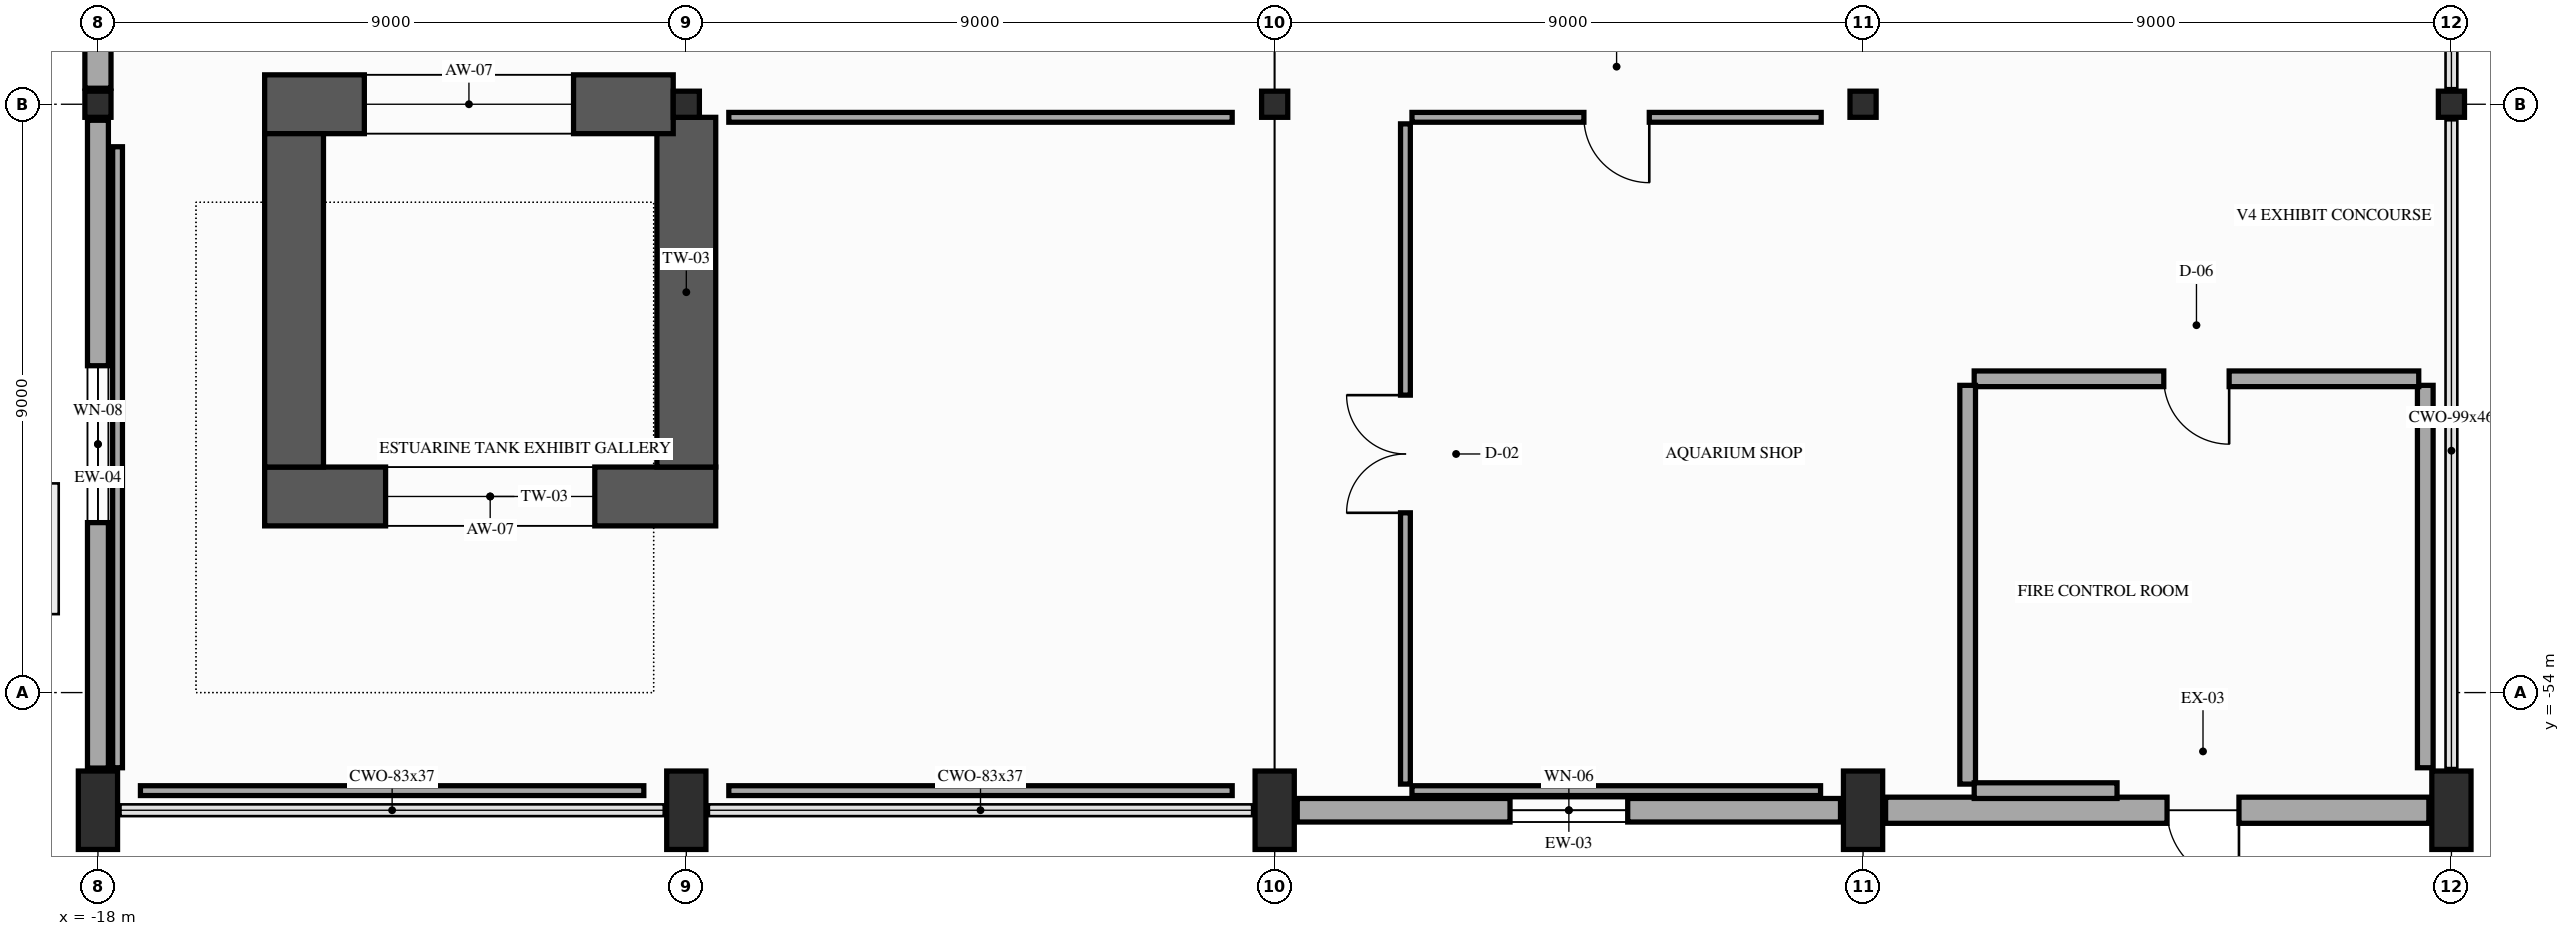
"""IFC4 building model, lengths in metres.
Left out: names, types, materials, properties, quantities, classifications, styles, units other than length and angle.
Written with IfcOpenShell. Run it as: python <this file> out.ifc"""

import sys

from ifc_helpers import new_model, si_unit, direction, frame, frame_2d, origin, origin_2d, place, context, subcontext, project, spatial, rectangle, i_section, extrude, element, fill, save


model = new_model("IFC4")
c1 = context("Model", 3, precision=1e-05, world=origin(), true_north=direction((0.0, 1.0)))
c2 = subcontext(c1, "Body", "Model", "MODEL_VIEW")
j1 = project(units=[si_unit("LENGTHUNIT", "METRE"), si_unit("PLANEANGLEUNIT", "RADIAN")], contexts=[c1])
p1 = place(None, origin())
s1 = spatial("IfcSite", under=j1, at=p1, CompositionType="ELEMENT")
p2 = place(p1, origin())
s2 = spatial("IfcBuilding", under=s1, at=p2, CompositionType="ELEMENT")
p3 = place(p2, origin())
s3 = spatial("IfcBuildingStorey", under=s2, at=p3, CompositionType="ELEMENT", Elevation=0.0)
p4 = place(p3, frame((-18.0, -55.8, 0.0), z_axis=(0.0, 0.0, 1.0), x_axis=(1.0, 0.0, 0.0)))
e1 = element("IfcColumn", 1, at=p4, inside=s3, PredefinedType="PILASTER", context=c2, shape_type="SweptSolid", body=[
    extrude(rectangle(XDim=0.6, YDim=1.2, at=origin_2d()), origin(), (0.0, 0.0, 1.0), 5.4),
])
p5 = place(p3, frame((-18.0, -45.0, 0.0), z_axis=(0.0, 0.0, 1.0), x_axis=(1.0, 0.0, 0.0)))
e2 = element("IfcColumn", 2, at=p5, inside=s3, PredefinedType="COLUMN", context=c2, shape_type="SweptSolid", body=[
    extrude(i_section(OverallWidth=0.4, OverallDepth=0.4, WebThickness=0.013, FlangeThickness=0.021, FilletRadius=0.022, at=origin_2d()), origin(), (0.0, 0.0, 1.0), 5.4),
])
p6 = place(p3, frame((-9.0, -55.8, 0.0), z_axis=(0.0, 0.0, 1.0), x_axis=(1.0, 0.0, 0.0)))
e3 = element("IfcColumn", 3, at=p6, inside=s3, PredefinedType="PILASTER", context=c2, shape_type="SweptSolid", body=[
    extrude(rectangle(XDim=0.6, YDim=1.2, at=origin_2d()), origin(), (0.0, 0.0, 1.0), 5.4),
])
p7 = place(p3, frame((-9.0, -45.0, 0.0), z_axis=(0.0, 0.0, 1.0), x_axis=(1.0, 0.0, 0.0)))
e4 = element("IfcColumn", 4, at=p7, inside=s3, PredefinedType="COLUMN", context=c2, shape_type="SweptSolid", body=[
    extrude(i_section(OverallWidth=0.4, OverallDepth=0.4, WebThickness=0.013, FlangeThickness=0.021, FilletRadius=0.022, at=origin_2d()), origin(), (0.0, 0.0, 1.0), 5.4),
])
p8 = place(p3, frame((0.0, -55.8, 0.0), z_axis=(0.0, 0.0, 1.0), x_axis=(1.0, 0.0, 0.0)))
e5 = element("IfcColumn", 5, at=p8, inside=s3, PredefinedType="PILASTER", context=c2, shape_type="SweptSolid", body=[
    extrude(rectangle(XDim=0.6, YDim=1.2, at=origin_2d()), origin(), (0.0, 0.0, 1.0), 5.4),
])
p9 = place(p3, frame((0.0, -45.0, 0.0), z_axis=(0.0, 0.0, 1.0), x_axis=(1.0, 0.0, 0.0)))
e6 = element("IfcColumn", 6, at=p9, inside=s3, PredefinedType="COLUMN", context=c2, shape_type="SweptSolid", body=[
    extrude(i_section(OverallWidth=0.4, OverallDepth=0.4, WebThickness=0.013, FlangeThickness=0.021, FilletRadius=0.022, at=origin_2d()), origin(), (0.0, 0.0, 1.0), 5.4),
])
p10 = place(p3, frame((9.0, -55.8, 0.0), z_axis=(0.0, 0.0, 1.0), x_axis=(1.0, 0.0, 0.0)))
e7 = element("IfcColumn", 7, at=p10, inside=s3, PredefinedType="PILASTER", context=c2, shape_type="SweptSolid", body=[
    extrude(rectangle(XDim=0.6, YDim=1.2, at=origin_2d()), origin(), (0.0, 0.0, 1.0), 5.4),
])
p11 = place(p3, frame((9.0, -45.0, 0.0), z_axis=(0.0, 0.0, 1.0), x_axis=(1.0, 0.0, 0.0)))
e8 = element("IfcColumn", 8, at=p11, inside=s3, PredefinedType="COLUMN", context=c2, shape_type="SweptSolid", body=[
    extrude(i_section(OverallWidth=0.4, OverallDepth=0.4, WebThickness=0.013, FlangeThickness=0.021, FilletRadius=0.022, at=origin_2d()), origin(), (0.0, 0.0, 1.0), 5.4),
])
p12 = place(p3, frame((18.0, -55.8, 0.0), z_axis=(0.0, 0.0, 1.0), x_axis=(1.0, 0.0, 0.0)))
e9 = element("IfcColumn", 9, at=p12, inside=s3, PredefinedType="PILASTER", context=c2, shape_type="SweptSolid", body=[
    extrude(rectangle(XDim=0.6, YDim=1.2, at=origin_2d()), origin(), (0.0, 0.0, 1.0), 5.4),
])
p13 = place(p3, frame((18.0, -45.0, 0.0), z_axis=(0.0, 0.0, 1.0), x_axis=(1.0, 0.0, 0.0)))
e10 = element("IfcColumn", 10, at=p13, inside=s3, PredefinedType="COLUMN", context=c2, shape_type="SweptSolid", body=[
    extrude(i_section(OverallWidth=0.4, OverallDepth=0.4, WebThickness=0.013, FlangeThickness=0.021, FilletRadius=0.022, at=origin_2d()), origin(), (0.0, 0.0, 1.0), 5.4),
])
p14 = place(p3, frame((-15.45, -51.0, 0.0), z_axis=(0.0, 0.0, 1.0), x_axis=(1.0, 0.0, 0.0)))
e11 = element("IfcWall", 11, at=p14, inside=s3, PredefinedType="SHEAR", context=c2, shape_type="SweptSolid", body=[
    extrude(rectangle(XDim=6.9, YDim=0.9, at=frame_2d((3.45, 0.0))), origin(), (0.0, 0.0, 1.0), 4.5),
])
p15 = place(p14, frame((1.85, 0.0, 0.8)))
e12 = element("IfcOpeningElement", 12, at=p15, cuts=e11, PredefinedType="OPENING", context=c2, shape_type="SweptSolid", body=[
    extrude(rectangle(XDim=3.2, YDim=2.2, at=frame_2d((1.6, 1.1))), frame((0.0, 0.46, 0.0), z_axis=(0.0, -1.0, 0.0), x_axis=(1.0, 0.0, 0.0)), (0.0, 0.0, 1.0), 0.92),
])
p16 = place(p3, frame((-9.0, -50.55, 0.0), z_axis=(0.0, 0.0, 1.0), x_axis=(0.0, 1.0, 0.0)))
e13 = element("IfcWall", 13, at=p16, inside=s3, PredefinedType="SHEAR", context=c2, shape_type="SweptSolid", body=[
    extrude(rectangle(XDim=5.35, YDim=0.9, at=frame_2d((2.675, 0.0))), origin(), (0.0, 0.0, 1.0), 4.5),
])
p17 = place(p3, frame((-9.2, -45.0, 0.0), z_axis=(0.0, 0.0, 1.0), x_axis=(-1.0, 0.0, 0.0)))
e14 = element("IfcWall", 14, at=p17, inside=s3, PredefinedType="SHEAR", context=c2, shape_type="SweptSolid", body=[
    extrude(rectangle(XDim=6.25, YDim=0.9, at=frame_2d((3.125, 0.0))), origin(), (0.0, 0.0, 1.0), 4.5),
])
p18 = place(p17, frame((1.525, 0.0, 0.8)))
e15 = element("IfcOpeningElement", 15, at=p18, cuts=e14, PredefinedType="OPENING", context=c2, shape_type="SweptSolid", body=[
    extrude(rectangle(XDim=3.2, YDim=2.2, at=frame_2d((1.6, 1.1))), frame((0.0, 0.46, 0.0), z_axis=(0.0, -1.0, 0.0), x_axis=(1.0, 0.0, 0.0)), (0.0, 0.0, 1.0), 0.92),
])
p19 = place(p3, frame((-15.0, -45.45, 0.0), z_axis=(0.0, 0.0, 1.0), x_axis=(0.0, -1.0, 0.0)))
e16 = element("IfcWall", 16, at=p19, inside=s3, PredefinedType="SHEAR", context=c2, shape_type="SweptSolid", body=[
    extrude(rectangle(XDim=5.1, YDim=0.9, at=frame_2d((2.55, 0.0))), origin(), (0.0, 0.0, 1.0), 4.5),
])
p20 = place(p3, frame((17.655, -55.8, 0.0), z_axis=(0.0, 0.0, 1.0), x_axis=(-1.0, 0.0, 0.0)))
e17 = element("IfcWall", 17, at=p20, inside=s3, PredefinedType="SOLIDWALL", context=c2, shape_type="SweptSolid", body=[
    extrude(rectangle(XDim=8.31, YDim=0.4, at=frame_2d((4.155, 0.0))), origin(), (0.0, 0.0, 1.0), 3.755),
])
p21 = place(p20, frame((2.905, 0.0, 0.0)))
e18 = element("IfcOpeningElement", 18, at=p21, cuts=e17, PredefinedType="OPENING", context=c2, shape_type="SweptSolid", body=[
    extrude(rectangle(XDim=1.1, YDim=2.2, at=frame_2d((0.55, 1.1))), frame((0.0, 0.21, 0.0), z_axis=(0.0, -1.0, 0.0), x_axis=(1.0, 0.0, 0.0)), (0.0, 0.0, 1.0), 0.42),
])
p22 = place(p3, frame((8.655, -55.8, 0.0), z_axis=(0.0, 0.0, 1.0), x_axis=(-1.0, 0.0, 0.0)))
e19 = element("IfcWall", 19, at=p22, inside=s3, PredefinedType="SOLIDWALL", context=c2, shape_type="SweptSolid", body=[
    extrude(rectangle(XDim=8.31, YDim=0.36, at=frame_2d((4.155, 0.0))), origin(), (0.0, 0.0, 1.0), 3.755),
])
p23 = place(p22, frame((3.255, 0.0, 0.9)))
e20 = element("IfcOpeningElement", 20, at=p23, cuts=e19, PredefinedType="OPENING", context=c2, shape_type="SweptSolid", body=[
    extrude(rectangle(XDim=1.8, YDim=2.2, at=frame_2d((0.9, 1.1))), frame((0.0, 0.19, 0.0), z_axis=(0.0, -1.0, 0.0), x_axis=(1.0, 0.0, 0.0)), (0.0, 0.0, 1.0), 0.38),
])
p24 = place(p3, frame((-18.0, -55.155, 0.0), z_axis=(0.0, 0.0, 1.0), x_axis=(0.0, 1.0, 0.0)))
e21 = element("IfcWall", 21, at=p24, inside=s3, PredefinedType="SOLIDWALL", context=c2, shape_type="SweptSolid", body=[
    extrude(rectangle(XDim=9.91, YDim=0.32, at=frame_2d((4.955, 0.0))), origin(), (0.0, 0.0, 1.0), 4.517),
])
p25 = place(p24, frame((3.755, 0.0, 0.9)))
e22 = element("IfcOpeningElement", 22, at=p25, cuts=e21, PredefinedType="OPENING", context=c2, shape_type="SweptSolid", body=[
    extrude(rectangle(XDim=2.4, YDim=2.4, at=frame_2d((1.2, 1.2))), frame((0.0, 0.17, 0.0), z_axis=(0.0, -1.0, 0.0), x_axis=(1.0, 0.0, 0.0)), (0.0, 0.0, 1.0), 0.34),
])
p26 = place(p3, frame((-18.0, -44.755, 0.0), z_axis=(0.0, 0.0, 1.0), x_axis=(0.0, 1.0, 0.0)))
e23 = element("IfcWall", 23, at=p26, inside=s3, PredefinedType="SOLIDWALL", context=c2, shape_type="SweptSolid", body=[
    extrude(rectangle(XDim=8.51, YDim=0.4, at=frame_2d((4.255, 0.0))), origin(), (0.0, 0.0, 1.0), 4.517),
])
p27 = place(p26, frame((2.655, 0.0, 0.0)))
e24 = element("IfcOpeningElement", 24, at=p27, cuts=e23, PredefinedType="OPENING", context=c2, shape_type="SweptSolid", body=[
    extrude(rectangle(XDim=3.2, YDim=2.8, at=frame_2d((1.6, 1.4))), frame((0.0, 0.21, 0.0), z_axis=(0.0, -1.0, 0.0), x_axis=(1.0, 0.0, 0.0)), (0.0, 0.0, 1.0), 0.42),
])
p28 = place(p3, frame((-17.35, -55.5, 0.0), z_axis=(0.0, 0.0, 1.0), x_axis=(1.0, 0.0, 0.0)))
e25 = element("IfcWall", 25, at=p28, inside=s3, PredefinedType="PARTITIONING", context=c2, shape_type="SweptSolid", body=[
    extrude(rectangle(XDim=7.7, YDim=0.15, at=frame_2d((3.85, 0.0))), origin(), (0.0, 0.0, 1.0), 4.517),
])
p29 = place(p3, frame((-8.35, -55.5, 0.0), z_axis=(0.0, 0.0, 1.0), x_axis=(1.0, 0.0, 0.0)))
e26 = element("IfcWall", 26, at=p29, inside=s3, PredefinedType="PARTITIONING", context=c2, shape_type="SweptSolid", body=[
    extrude(rectangle(XDim=7.7, YDim=0.15, at=frame_2d((3.85, 0.0))), origin(), (0.0, 0.0, 1.0), 3.755),
])
p30 = place(p3, frame((2.0, -55.4, 0.0), z_axis=(0.0, 0.0, 1.0), x_axis=(0.0, 1.0, 0.0)))
e27 = element("IfcWall", 27, at=p30, inside=s3, PredefinedType="PARTITIONING", context=c2, shape_type="SweptSolid", body=[
    extrude(rectangle(XDim=10.1, YDim=0.15, at=frame_2d((5.05, 0.0))), origin(), (0.0, 0.0, 1.0), 3.755),
])
p31 = place(p30, frame((4.15, 0.0, 0.0)))
e28 = element("IfcOpeningElement", 28, at=p31, cuts=e27, PredefinedType="OPENING", context=c2, shape_type="SweptSolid", body=[
    extrude(rectangle(XDim=1.8, YDim=2.3, at=frame_2d((0.9, 1.15))), frame((0.0, 0.085, 0.0), z_axis=(0.0, -1.0, 0.0), x_axis=(1.0, 0.0, 0.0)), (0.0, 0.0, 1.0), 0.17),
])
p32 = place(p3, frame((-0.65, -45.2, 0.0), z_axis=(0.0, 0.0, 1.0), x_axis=(-1.0, 0.0, 0.0)))
e29 = element("IfcWall", 29, at=p32, inside=s3, PredefinedType="PARTITIONING", context=c2, shape_type="SweptSolid", body=[
    extrude(rectangle(XDim=7.7, YDim=0.15, at=frame_2d((3.85, 0.0))), origin(), (0.0, 0.0, 1.0), 4.517),
])
p33 = place(p3, frame((-17.7, -45.65, 0.0), z_axis=(0.0, 0.0, 1.0), x_axis=(0.0, -1.0, 0.0)))
e30 = element("IfcWall", 30, at=p33, inside=s3, PredefinedType="PARTITIONING", context=c2, shape_type="SweptSolid", body=[
    extrude(rectangle(XDim=9.5, YDim=0.15, at=frame_2d((4.75, 0.0))), origin(), (0.0, 0.0, 1.0), 4.617),
])
p34 = place(p3, frame((17.6, -55.15, 0.0), z_axis=(0.0, 0.0, 1.0), x_axis=(0.0, 1.0, 0.0)))
e31 = element("IfcWall", 31, at=p34, inside=s3, PredefinedType="PARTITIONING", context=c2, shape_type="SweptSolid", body=[
    extrude(rectangle(XDim=5.85, YDim=0.24, at=frame_2d((2.925, 0.0))), origin(), (0.0, 0.0, 1.0), 4.617),
])
p35 = place(p3, frame((17.5, -49.2, 0.0), z_axis=(0.0, 0.0, 1.0), x_axis=(-1.0, 0.0, 0.0)))
e32 = element("IfcWall", 32, at=p35, inside=s3, PredefinedType="PARTITIONING", context=c2, shape_type="SweptSolid", body=[
    extrude(rectangle(XDim=6.8, YDim=0.24, at=frame_2d((3.4, 0.0))), origin(), (0.0, 0.0, 1.0), 4.617),
])
p36 = place(p35, frame((2.9, 0.0, 0.0)))
e33 = element("IfcOpeningElement", 33, at=p36, cuts=e32, PredefinedType="OPENING", context=c2, shape_type="SweptSolid", body=[
    extrude(rectangle(XDim=1.0, YDim=2.15, at=frame_2d((0.5, 1.075))), frame((0.0, 0.13, 0.0), z_axis=(0.0, -1.0, 0.0), x_axis=(1.0, 0.0, 0.0)), (0.0, 0.0, 1.0), 0.26),
])
p37 = place(p3, frame((10.6, -49.3, 0.0), z_axis=(0.0, 0.0, 1.0), x_axis=(0.0, -1.0, 0.0)))
e34 = element("IfcWall", 34, at=p37, inside=s3, PredefinedType="PARTITIONING", context=c2, shape_type="SweptSolid", body=[
    extrude(rectangle(XDim=6.1, YDim=0.24, at=frame_2d((3.05, 0.0))), origin(), (0.0, 0.0, 1.0), 4.517),
])
p38 = place(p3, frame((10.7, -55.5, 0.0), z_axis=(0.0, 0.0, 1.0), x_axis=(1.0, 0.0, 0.0)))
e35 = element("IfcWall", 35, at=p38, inside=s3, PredefinedType="PARTITIONING", context=c2, shape_type="SweptSolid", body=[
    extrude(rectangle(XDim=2.185, YDim=0.24, at=frame_2d((1.093, 0.0))), origin(), (0.0, 0.0, 1.0), 4.517),
])
p39 = place(p3, frame((8.36, -45.2, 0.0), z_axis=(0.0, 0.0, 1.0), x_axis=(-1.0, 0.0, 0.0)))
e36 = element("IfcWall", 36, at=p39, inside=s3, PredefinedType="PARTITIONING", context=c2, shape_type="SweptSolid", body=[
    extrude(rectangle(XDim=6.26, YDim=0.15, at=frame_2d((3.13, 0.0))), origin(), (0.0, 0.0, 1.0), 4.517),
])
p40 = place(p39, frame((2.63, 0.0, 0.0)))
e37 = element("IfcOpeningElement", 37, at=p40, cuts=e36, PredefinedType="OPENING", context=c2, shape_type="SweptSolid", body=[
    extrude(rectangle(XDim=1.0, YDim=2.15, at=frame_2d((0.5, 1.075))), frame((0.0, 0.085, 0.0), z_axis=(0.0, -1.0, 0.0), x_axis=(1.0, 0.0, 0.0)), (0.0, 0.0, 1.0), 0.17),
])
p41 = place(p3, frame((2.1, -55.5, 0.0), z_axis=(0.0, 0.0, 1.0), x_axis=(1.0, 0.0, 0.0)))
e38 = element("IfcWall", 38, at=p41, inside=s3, PredefinedType="PARTITIONING", context=c2, shape_type="SweptSolid", body=[
    extrude(rectangle(XDim=6.25, YDim=0.15, at=frame_2d((3.125, 0.0))), origin(), (0.0, 0.0, 1.0), 3.755),
])
p42 = place(p15, origin())
e39 = element("IfcWindow", 39, at=p42, inside=s3, PartitioningType="SINGLE_PANEL", PredefinedType="WINDOW", context=c2, shape_type="SweptSolid", body=[
    extrude(rectangle(XDim=3.2, YDim=2.2, at=frame_2d((1.6, 1.1))), frame((0.0, 0.03, 0.0), z_axis=(0.0, -1.0, 0.0), x_axis=(1.0, 0.0, 0.0)), (0.0, 0.0, 1.0), 0.06),
])
fill(e12, e39)
p43 = place(p18, origin())
e40 = element("IfcWindow", 40, at=p43, inside=s3, PartitioningType="SINGLE_PANEL", PredefinedType="WINDOW", context=c2, shape_type="SweptSolid", body=[
    extrude(rectangle(XDim=3.2, YDim=2.2, at=frame_2d((1.6, 1.1))), frame((0.0, 0.03, 0.0), z_axis=(0.0, -1.0, 0.0), x_axis=(1.0, 0.0, 0.0)), (0.0, 0.0, 1.0), 0.06),
])
fill(e15, e40)
p44 = place(p21, origin())
e41 = element("IfcDoor", 41, at=p44, inside=s3, OperationType="SINGLE_SWING_LEFT", PredefinedType="DOOR", context=c2, shape_type="SweptSolid", body=[
    extrude(rectangle(XDim=1.1, YDim=2.2, at=frame_2d((0.55, 1.1))), frame((0.0, 0.025, 0.0), z_axis=(0.0, -1.0, 0.0), x_axis=(1.0, 0.0, 0.0)), (0.0, 0.0, 1.0), 0.05),
])
fill(e18, e41)
p45 = place(p23, origin())
e42 = element("IfcWindow", 42, at=p45, inside=s3, PartitioningType="SINGLE_PANEL", PredefinedType="WINDOW", context=c2, shape_type="SweptSolid", body=[
    extrude(rectangle(XDim=1.8, YDim=2.2, at=frame_2d((0.9, 1.1))), frame((0.0, 0.03, 0.0), z_axis=(0.0, -1.0, 0.0), x_axis=(1.0, 0.0, 0.0)), (0.0, 0.0, 1.0), 0.06),
])
fill(e20, e42)
p46 = place(p25, origin())
e43 = element("IfcWindow", 43, at=p46, inside=s3, PartitioningType="SINGLE_PANEL", PredefinedType="WINDOW", context=c2, shape_type="SweptSolid", body=[
    extrude(rectangle(XDim=2.4, YDim=2.4, at=frame_2d((1.2, 1.2))), frame((0.0, 0.03, 0.0), z_axis=(0.0, -1.0, 0.0), x_axis=(1.0, 0.0, 0.0)), (0.0, 0.0, 1.0), 0.06),
])
fill(e22, e43)
p47 = place(p31, origin())
e44 = element("IfcDoor", 44, at=p47, inside=s3, OperationType="DOUBLE_DOOR_SINGLE_SWING", PredefinedType="DOOR", context=c2, shape_type="SweptSolid", body=[
    extrude(rectangle(XDim=1.8, YDim=2.3, at=frame_2d((0.9, 1.15))), frame((0.0, 0.025, 0.0), z_axis=(0.0, -1.0, 0.0), x_axis=(1.0, 0.0, 0.0)), (0.0, 0.0, 1.0), 0.05),
])
fill(e28, e44)
p48 = place(p36, origin())
e45 = element("IfcDoor", 45, at=p48, inside=s3, OperationType="SINGLE_SWING_LEFT", PredefinedType="DOOR", context=c2, shape_type="SweptSolid", body=[
    extrude(rectangle(XDim=1.0, YDim=2.15, at=frame_2d((0.5, 1.075))), frame((0.0, 0.025, 0.0), z_axis=(0.0, -1.0, 0.0), x_axis=(1.0, 0.0, 0.0)), (0.0, 0.0, 1.0), 0.05),
])
fill(e33, e45)
p49 = place(p40, origin())
e46 = element("IfcDoor", 46, at=p49, inside=s3, OperationType="SINGLE_SWING_LEFT", PredefinedType="DOOR", context=c2, shape_type="SweptSolid", body=[
    extrude(rectangle(XDim=1.0, YDim=2.15, at=frame_2d((0.5, 1.075))), frame((0.0, 0.025, 0.0), z_axis=(0.0, -1.0, 0.0), x_axis=(1.0, 0.0, 0.0)), (0.0, 0.0, 1.0), 0.05),
])
fill(e37, e46)
save(model, sys.argv[1])
